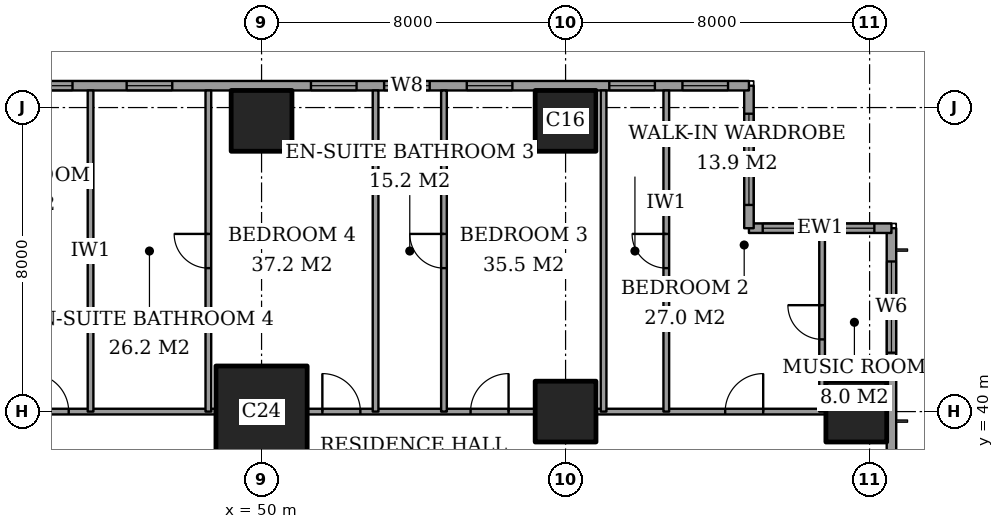
"""IFC4 building model, lengths in metres.
Left out: names, types, materials, properties, quantities, classifications, styles, units other than length and angle.
Written with IfcOpenShell. Run it as: python <this file> out.ifc"""

import sys

from ifc_helpers import new_model, si_unit, direction, frame, frame_2d, origin, origin_2d, place, context, subcontext, project, spatial, rectangle, extrude, element, fill, save


model = new_model("IFC4")
c1 = context("Model", 3, precision=1e-05, world=origin(), true_north=direction((0.0, 1.0)))
c2 = subcontext(c1, "Body", "Model", "MODEL_VIEW")
j1 = project(units=[si_unit("LENGTHUNIT", "METRE"), si_unit("PLANEANGLEUNIT", "RADIAN")], contexts=[c1])
p1 = place(None, origin())
s1 = spatial("IfcSite", under=j1, at=p1, CompositionType="ELEMENT")
p2 = place(p1, origin())
s2 = spatial("IfcBuilding", under=s1, at=p2, CompositionType="ELEMENT")
p3 = place(p2, frame((0.0, 0.0, 237.6)))
s3 = spatial("IfcBuildingStorey", under=s2, at=p3, CompositionType="ELEMENT", Elevation=237.6)
p4 = place(p3, frame((50.0, 40.0, 0.0), z_axis=(0.0, 0.0, 1.0), x_axis=(1.0, 0.0, 0.0)))
e1 = element("IfcColumn", 1, at=p4, inside=s3, PredefinedType="COLUMN", context=c2, shape_type="SweptSolid", body=[
    extrude(rectangle(XDim=2.4, YDim=2.4, at=origin_2d()), origin(), (0.0, 0.0, 1.0), 3.6),
])
for number, where, z_axis, x_axis in (
    (2, (50.0, 47.65, 0.0), (0.0, 0.0, 1.0), (1.0, 0.0, 0.0)),
    (3, (58.0, 40.0, 0.0), (0.0, 0.0, 1.0), (1.0, 0.0, 0.0)),
    (4, (58.0, 47.65, 0.0), (0.0, 0.0, 1.0), (1.0, 0.0, 0.0)),
    (5, (65.65, 40.0, 0.0), (0.0, 0.0, 1.0), (1.0, 0.0, 0.0)),
):
    element("IfcColumn", number, at=place(p3, frame(where, z_axis=z_axis, x_axis=x_axis)), inside=s3, PredefinedType="COLUMN", context=c2, shape_type="SweptSolid", body=[
        extrude(rectangle(XDim=1.6, YDim=1.6, at=origin_2d()), origin(), (0.0, 0.0, 1.0), 3.6),
    ])
p5 = place(p3, frame((66.575, 3.175, 0.0), z_axis=(0.0, 0.0, 1.0), x_axis=(0.0, 1.0, 0.0)))
e6 = element("IfcWall", 6, at=p5, inside=s3, PredefinedType="SOLIDWALL", context=c2, shape_type="SweptSolid", body=[
    extrude(rectangle(XDim=41.65, YDim=0.25, at=frame_2d((20.825, 0.0))), origin(), (0.0, 0.0, 1.0), 3.6),
])
p6 = place(p5, frame((0.875, 0.0, 0.6)))
e7 = element("IfcOpeningElement", 7, at=p6, cuts=e6, PredefinedType="OPENING", context=c2, shape_type="SweptSolid", body=[
    extrude(rectangle(XDim=2.4, YDim=2.0, at=frame_2d((1.2, 1.0))), frame((0.0, 0.135, 0.0), z_axis=(0.0, -1.0, 0.0), x_axis=(1.0, 0.0, 0.0)), (0.0, 0.0, 1.0), 0.27),
])
p7 = place(p5, frame((6.225, 0.0, 0.6)))
e8 = element("IfcOpeningElement", 8, at=p7, cuts=e6, PredefinedType="OPENING", context=c2, shape_type="SweptSolid", body=[
    extrude(rectangle(XDim=1.2, YDim=2.0, at=frame_2d((0.6, 1.0))), frame((0.0, 0.135, 0.0), z_axis=(0.0, -1.0, 0.0), x_axis=(1.0, 0.0, 0.0)), (0.0, 0.0, 1.0), 0.27),
])
p8 = place(p5, frame((8.725, 0.0, 0.6)))
e9 = element("IfcOpeningElement", 9, at=p8, cuts=e6, PredefinedType="OPENING", context=c2, shape_type="SweptSolid", body=[
    extrude(rectangle(XDim=2.4, YDim=2.0, at=frame_2d((1.2, 1.0))), frame((0.0, 0.135, 0.0), z_axis=(0.0, -1.0, 0.0), x_axis=(1.0, 0.0, 0.0)), (0.0, 0.0, 1.0), 0.27),
])
p9 = place(p5, frame((15.725, 0.0, 0.6)))
e10 = element("IfcOpeningElement", 10, at=p9, cuts=e6, PredefinedType="OPENING", context=c2, shape_type="SweptSolid", body=[
    extrude(rectangle(XDim=2.4, YDim=2.0, at=frame_2d((1.2, 1.0))), frame((0.0, 0.135, 0.0), z_axis=(0.0, -1.0, 0.0), x_axis=(1.0, 0.0, 0.0)), (0.0, 0.0, 1.0), 0.27),
])
p10 = place(p5, frame((23.525, 0.0, 0.6)))
e11 = element("IfcOpeningElement", 11, at=p10, cuts=e6, PredefinedType="OPENING", context=c2, shape_type="SweptSolid", body=[
    extrude(rectangle(XDim=2.4, YDim=2.0, at=frame_2d((1.2, 1.0))), frame((0.0, 0.135, 0.0), z_axis=(0.0, -1.0, 0.0), x_axis=(1.0, 0.0, 0.0)), (0.0, 0.0, 1.0), 0.27),
])
p11 = place(p5, frame((30.725, 0.0, 0.6)))
e12 = element("IfcOpeningElement", 12, at=p11, cuts=e6, PredefinedType="OPENING", context=c2, shape_type="SweptSolid", body=[
    extrude(rectangle(XDim=2.4, YDim=2.0, at=frame_2d((1.2, 1.0))), frame((0.0, 0.135, 0.0), z_axis=(0.0, -1.0, 0.0), x_axis=(1.0, 0.0, 0.0)), (0.0, 0.0, 1.0), 0.27),
])
p12 = place(p5, frame((34.525, 0.0, 0.6)))
e13 = element("IfcOpeningElement", 13, at=p12, cuts=e6, PredefinedType="OPENING", context=c2, shape_type="SweptSolid", body=[
    extrude(rectangle(XDim=1.2, YDim=2.0, at=frame_2d((0.6, 1.0))), frame((0.0, 0.135, 0.0), z_axis=(0.0, -1.0, 0.0), x_axis=(1.0, 0.0, 0.0)), (0.0, 0.0, 1.0), 0.27),
])
p13 = place(p5, frame((38.375, 0.0, 0.6)))
e14 = element("IfcOpeningElement", 14, at=p13, cuts=e6, PredefinedType="OPENING", context=c2, shape_type="SweptSolid", body=[
    extrude(rectangle(XDim=2.4, YDim=2.0, at=frame_2d((1.2, 1.0))), frame((0.0, 0.135, 0.0), z_axis=(0.0, -1.0, 0.0), x_axis=(1.0, 0.0, 0.0)), (0.0, 0.0, 1.0), 0.27),
])
p14 = place(p3, frame((66.575, 44.825, 0.0), z_axis=(0.0, 0.0, 1.0), x_axis=(-1.0, 0.0, 0.0)))
e15 = element("IfcWall", 15, at=p14, inside=s3, PredefinedType="SOLIDWALL", context=c2, shape_type="SweptSolid", body=[
    extrude(rectangle(XDim=3.75, YDim=0.25, at=frame_2d((1.875, 0.0))), origin(), (0.0, 0.0, 1.0), 3.6),
])
p15 = place(p14, frame((0.45, 0.0, 0.6)))
e16 = element("IfcOpeningElement", 16, at=p15, cuts=e15, PredefinedType="OPENING", context=c2, shape_type="SweptSolid", body=[
    extrude(rectangle(XDim=1.2, YDim=2.0, at=frame_2d((0.6, 1.0))), frame((0.0, 0.135, 0.0), z_axis=(0.0, -1.0, 0.0), x_axis=(1.0, 0.0, 0.0)), (0.0, 0.0, 1.0), 0.27),
])
p16 = place(p14, frame((2.188, 0.0, 0.6)))
e17 = element("IfcOpeningElement", 17, at=p16, cuts=e15, PredefinedType="OPENING", context=c2, shape_type="SweptSolid", body=[
    extrude(rectangle(XDim=1.2, YDim=2.0, at=frame_2d((0.6, 1.0))), frame((0.0, 0.135, 0.0), z_axis=(0.0, -1.0, 0.0), x_axis=(1.0, 0.0, 0.0)), (0.0, 0.0, 1.0), 0.27),
])
p17 = place(p3, frame((62.825, 44.825, 0.0), z_axis=(0.0, 0.0, 1.0), x_axis=(0.0, 1.0, 0.0)))
e18 = element("IfcWall", 18, at=p17, inside=s3, PredefinedType="SOLIDWALL", context=c2, shape_type="SweptSolid", body=[
    extrude(rectangle(XDim=3.75, YDim=0.25, at=frame_2d((1.875, 0.0))), origin(), (0.0, 0.0, 1.0), 3.6),
])
p18 = place(p17, frame((0.613, 0.0, 0.6)))
e19 = element("IfcOpeningElement", 19, at=p18, cuts=e18, PredefinedType="OPENING", context=c2, shape_type="SweptSolid", body=[
    extrude(rectangle(XDim=2.4, YDim=2.0, at=frame_2d((1.2, 1.0))), frame((0.0, 0.135, 0.0), z_axis=(0.0, -1.0, 0.0), x_axis=(1.0, 0.0, 0.0)), (0.0, 0.0, 1.0), 0.27),
])
p19 = place(p3, frame((62.825, 48.575, 0.0), z_axis=(0.0, 0.0, 1.0), x_axis=(-1.0, 0.0, 0.0)))
e20 = element("IfcWall", 20, at=p19, inside=s3, PredefinedType="SOLIDWALL", context=c2, shape_type="SweptSolid", body=[
    extrude(rectangle(XDim=21.4, YDim=0.25, at=frame_2d((10.7, 0.0))), origin(), (0.0, 0.0, 1.0), 3.6),
])
p20 = place(p19, frame((0.55, 0.0, 0.6)))
e21 = element("IfcOpeningElement", 21, at=p20, cuts=e20, PredefinedType="OPENING", context=c2, shape_type="SweptSolid", body=[
    extrude(rectangle(XDim=1.2, YDim=2.0, at=frame_2d((0.6, 1.0))), frame((0.0, 0.135, 0.0), z_axis=(0.0, -1.0, 0.0), x_axis=(1.0, 0.0, 0.0)), (0.0, 0.0, 1.0), 0.27),
])
p21 = place(p19, frame((2.475, 0.0, 0.6)))
e22 = element("IfcOpeningElement", 22, at=p21, cuts=e20, PredefinedType="OPENING", context=c2, shape_type="SweptSolid", body=[
    extrude(rectangle(XDim=1.2, YDim=2.0, at=frame_2d((0.6, 1.0))), frame((0.0, 0.135, 0.0), z_axis=(0.0, -1.0, 0.0), x_axis=(1.0, 0.0, 0.0)), (0.0, 0.0, 1.0), 0.27),
])
p22 = place(p19, frame((6.225, 0.0, 0.6)))
e23 = element("IfcOpeningElement", 23, at=p22, cuts=e20, PredefinedType="OPENING", context=c2, shape_type="SweptSolid", body=[
    extrude(rectangle(XDim=1.2, YDim=2.0, at=frame_2d((0.6, 1.0))), frame((0.0, 0.135, 0.0), z_axis=(0.0, -1.0, 0.0), x_axis=(1.0, 0.0, 0.0)), (0.0, 0.0, 1.0), 0.27),
])
p23 = place(p19, frame((8.4, 0.0, 0.6)))
e24 = element("IfcOpeningElement", 24, at=p23, cuts=e20, PredefinedType="OPENING", context=c2, shape_type="SweptSolid", body=[
    extrude(rectangle(XDim=1.2, YDim=2.0, at=frame_2d((0.6, 1.0))), frame((0.0, 0.135, 0.0), z_axis=(0.0, -1.0, 0.0), x_axis=(1.0, 0.0, 0.0)), (0.0, 0.0, 1.0), 0.27),
])
p24 = place(p19, frame((10.325, 0.0, 0.6)))
e25 = element("IfcOpeningElement", 25, at=p24, cuts=e20, PredefinedType="OPENING", context=c2, shape_type="SweptSolid", body=[
    extrude(rectangle(XDim=1.2, YDim=2.0, at=frame_2d((0.6, 1.0))), frame((0.0, 0.135, 0.0), z_axis=(0.0, -1.0, 0.0), x_axis=(1.0, 0.0, 0.0)), (0.0, 0.0, 1.0), 0.27),
])
p25 = place(p19, frame((15.175, 0.0, 0.6)))
e26 = element("IfcOpeningElement", 26, at=p25, cuts=e20, PredefinedType="OPENING", context=c2, shape_type="SweptSolid", body=[
    extrude(rectangle(XDim=1.2, YDim=2.0, at=frame_2d((0.6, 1.0))), frame((0.0, 0.135, 0.0), z_axis=(0.0, -1.0, 0.0), x_axis=(1.0, 0.0, 0.0)), (0.0, 0.0, 1.0), 0.27),
])
p26 = place(p19, frame((17.8, 0.0, 0.6)))
e27 = element("IfcOpeningElement", 27, at=p26, cuts=e20, PredefinedType="OPENING", context=c2, shape_type="SweptSolid", body=[
    extrude(rectangle(XDim=1.2, YDim=2.0, at=frame_2d((0.6, 1.0))), frame((0.0, 0.135, 0.0), z_axis=(0.0, -1.0, 0.0), x_axis=(1.0, 0.0, 0.0)), (0.0, 0.0, 1.0), 0.27),
])
p27 = place(p3, frame((43.35, 40.0, 0.0), z_axis=(0.0, 0.0, 1.0), x_axis=(1.0, 0.0, 0.0)))
e28 = element("IfcWall", 28, at=p27, inside=s3, PredefinedType="PARTITIONING", context=c2, shape_type="SweptSolid", body=[
    extrude(rectangle(XDim=5.45, YDim=0.15, at=frame_2d((2.725, 0.0))), origin(), (0.0, 0.0, 1.0), 3.35),
])
p28 = place(p27, frame((0.575, 0.0, 0.0)))
e29 = element("IfcOpeningElement", 29, at=p28, cuts=e28, PredefinedType="OPENING", context=c2, shape_type="SweptSolid", body=[
    extrude(rectangle(XDim=1.0, YDim=2.1, at=frame_2d((0.5, 1.05))), frame((0.0, 0.085, 0.0), z_axis=(0.0, -1.0, 0.0), x_axis=(1.0, 0.0, 0.0)), (0.0, 0.0, 1.0), 0.17),
])
p29 = place(p3, frame((51.2, 40.0, 0.0), z_axis=(0.0, 0.0, 1.0), x_axis=(1.0, 0.0, 0.0)))
e30 = element("IfcWall", 30, at=p29, inside=s3, PredefinedType="PARTITIONING", context=c2, shape_type="SweptSolid", body=[
    extrude(rectangle(XDim=6.0, YDim=0.15, at=frame_2d((3.0, 0.0))), origin(), (0.0, 0.0, 1.0), 3.35),
])
p30 = place(p29, frame((4.3, 0.0, 0.0)))
e31 = element("IfcOpeningElement", 31, at=p30, cuts=e30, PredefinedType="OPENING", context=c2, shape_type="SweptSolid", body=[
    extrude(rectangle(XDim=1.0, YDim=2.1, at=frame_2d((0.5, 1.05))), frame((0.0, 0.085, 0.0), z_axis=(0.0, -1.0, 0.0), x_axis=(1.0, 0.0, 0.0)), (0.0, 0.0, 1.0), 0.17),
])
p31 = place(p29, frame((0.4, 0.0, 0.0)))
e32 = element("IfcOpeningElement", 32, at=p31, cuts=e30, PredefinedType="OPENING", context=c2, shape_type="SweptSolid", body=[
    extrude(rectangle(XDim=1.0, YDim=2.1, at=frame_2d((0.5, 1.05))), frame((0.0, 0.085, 0.0), z_axis=(0.0, -1.0, 0.0), x_axis=(1.0, 0.0, 0.0)), (0.0, 0.0, 1.0), 0.17),
])
p32 = place(p3, frame((58.8, 40.0, 0.0), z_axis=(0.0, 0.0, 1.0), x_axis=(1.0, 0.0, 0.0)))
e33 = element("IfcWall", 33, at=p32, inside=s3, PredefinedType="PARTITIONING", context=c2, shape_type="SweptSolid", body=[
    extrude(rectangle(XDim=6.05, YDim=0.15, at=frame_2d((3.025, 0.0))), origin(), (0.0, 0.0, 1.0), 3.35),
])
p33 = place(p32, frame((3.4, 0.0, 0.0)))
e34 = element("IfcOpeningElement", 34, at=p33, cuts=e33, PredefinedType="OPENING", context=c2, shape_type="SweptSolid", body=[
    extrude(rectangle(XDim=1.0, YDim=2.1, at=frame_2d((0.5, 1.05))), frame((0.0, 0.085, 0.0), z_axis=(0.0, -1.0, 0.0), x_axis=(1.0, 0.0, 0.0)), (0.0, 0.0, 1.0), 0.17),
])
p34 = place(p3, frame((45.5, 40.0, 0.0), z_axis=(0.0, 0.0, 1.0), x_axis=(0.0, 1.0, 0.0)))
e35 = element("IfcWall", 35, at=p34, inside=s3, PredefinedType="PARTITIONING", context=c2, shape_type="SweptSolid", body=[
    extrude(rectangle(XDim=8.45, YDim=0.15, at=frame_2d((4.225, 0.0))), origin(), (0.0, 0.0, 1.0), 3.35),
])
p35 = place(p3, frame((48.6, 40.0, 0.0), z_axis=(0.0, 0.0, 1.0), x_axis=(0.0, 1.0, 0.0)))
e36 = element("IfcWall", 36, at=p35, inside=s3, PredefinedType="PARTITIONING", context=c2, shape_type="SweptSolid", body=[
    extrude(rectangle(XDim=8.45, YDim=0.15, at=frame_2d((4.225, 0.0))), origin(), (0.0, 0.0, 1.0), 3.35),
])
p36 = place(p35, frame((3.775, 0.0, 0.0)))
e37 = element("IfcOpeningElement", 37, at=p36, cuts=e36, PredefinedType="OPENING", context=c2, shape_type="SweptSolid", body=[
    extrude(rectangle(XDim=0.9, YDim=2.1, at=frame_2d((0.45, 1.05))), frame((0.0, 0.085, 0.0), z_axis=(0.0, -1.0, 0.0), x_axis=(1.0, 0.0, 0.0)), (0.0, 0.0, 1.0), 0.17),
])
p37 = place(p3, frame((53.0, 40.0, 0.0), z_axis=(0.0, 0.0, 1.0), x_axis=(0.0, 1.0, 0.0)))
e38 = element("IfcWall", 38, at=p37, inside=s3, PredefinedType="PARTITIONING", context=c2, shape_type="SweptSolid", body=[
    extrude(rectangle(XDim=8.45, YDim=0.15, at=frame_2d((4.225, 0.0))), origin(), (0.0, 0.0, 1.0), 3.35),
])
p38 = place(p3, frame((54.8, 40.0, 0.0), z_axis=(0.0, 0.0, 1.0), x_axis=(0.0, 1.0, 0.0)))
e39 = element("IfcWall", 39, at=p38, inside=s3, PredefinedType="PARTITIONING", context=c2, shape_type="SweptSolid", body=[
    extrude(rectangle(XDim=8.45, YDim=0.15, at=frame_2d((4.225, 0.0))), origin(), (0.0, 0.0, 1.0), 3.35),
])
p39 = place(p38, frame((3.775, 0.0, 0.0)))
e40 = element("IfcOpeningElement", 40, at=p39, cuts=e39, PredefinedType="OPENING", context=c2, shape_type="SweptSolid", body=[
    extrude(rectangle(XDim=0.9, YDim=2.1, at=frame_2d((0.45, 1.05))), frame((0.0, 0.085, 0.0), z_axis=(0.0, -1.0, 0.0), x_axis=(1.0, 0.0, 0.0)), (0.0, 0.0, 1.0), 0.17),
])
p40 = place(p3, frame((59.0, 40.0, 0.0), z_axis=(0.0, 0.0, 1.0), x_axis=(0.0, 1.0, 0.0)))
e41 = element("IfcWall", 41, at=p40, inside=s3, PredefinedType="PARTITIONING", context=c2, shape_type="SweptSolid", body=[
    extrude(rectangle(XDim=8.45, YDim=0.15, at=frame_2d((4.225, 0.0))), origin(), (0.0, 0.0, 1.0), 3.35),
])
p41 = place(p3, frame((60.65, 40.0, 0.0), z_axis=(0.0, 0.0, 1.0), x_axis=(0.0, 1.0, 0.0)))
e42 = element("IfcWall", 42, at=p41, inside=s3, PredefinedType="PARTITIONING", context=c2, shape_type="SweptSolid", body=[
    extrude(rectangle(XDim=8.45, YDim=0.15, at=frame_2d((4.225, 0.0))), origin(), (0.0, 0.0, 1.0), 3.35),
])
p42 = place(p41, frame((3.775, 0.0, 0.0)))
e43 = element("IfcOpeningElement", 43, at=p42, cuts=e42, PredefinedType="OPENING", context=c2, shape_type="SweptSolid", body=[
    extrude(rectangle(XDim=0.9, YDim=2.1, at=frame_2d((0.45, 1.05))), frame((0.0, 0.085, 0.0), z_axis=(0.0, -1.0, 0.0), x_axis=(1.0, 0.0, 0.0)), (0.0, 0.0, 1.0), 0.17),
])
p43 = place(p3, frame((64.75, 40.0, 0.0), z_axis=(0.0, 0.0, 1.0), x_axis=(0.0, 1.0, 0.0)))
e44 = element("IfcWall", 44, at=p43, inside=s3, PredefinedType="PARTITIONING", context=c2, shape_type="SweptSolid", body=[
    extrude(rectangle(XDim=4.7, YDim=0.15, at=frame_2d((2.35, 0.0))), origin(), (0.0, 0.0, 1.0), 3.35),
])
p44 = place(p43, frame((1.9, 0.0, 0.0)))
e45 = element("IfcOpeningElement", 45, at=p44, cuts=e44, PredefinedType="OPENING", context=c2, shape_type="SweptSolid", body=[
    extrude(rectangle(XDim=0.9, YDim=2.1, at=frame_2d((0.45, 1.05))), frame((0.0, 0.085, 0.0), z_axis=(0.0, -1.0, 0.0), x_axis=(1.0, 0.0, 0.0)), (0.0, 0.0, 1.0), 0.17),
])
p45 = place(p13, origin())
e46 = element("IfcWindow", 46, at=p45, inside=s3, PartitioningType="SINGLE_PANEL", PredefinedType="WINDOW", context=c2, shape_type="SweptSolid", body=[
    extrude(rectangle(XDim=2.4, YDim=2.0, at=frame_2d((1.2, 1.0))), frame((0.0, 0.03, 0.0), z_axis=(0.0, -1.0, 0.0), x_axis=(1.0, 0.0, 0.0)), (0.0, 0.0, 1.0), 0.06),
])
fill(e14, e46)
p46 = place(p15, origin())
e47 = element("IfcWindow", 47, at=p46, inside=s3, PartitioningType="SINGLE_PANEL", PredefinedType="WINDOW", context=c2, shape_type="SweptSolid", body=[
    extrude(rectangle(XDim=1.2, YDim=2.0, at=frame_2d((0.6, 1.0))), frame((0.0, 0.03, 0.0), z_axis=(0.0, -1.0, 0.0), x_axis=(1.0, 0.0, 0.0)), (0.0, 0.0, 1.0), 0.06),
])
fill(e16, e47)
p47 = place(p16, origin())
e48 = element("IfcWindow", 48, at=p47, inside=s3, PartitioningType="SINGLE_PANEL", PredefinedType="WINDOW", context=c2, shape_type="SweptSolid", body=[
    extrude(rectangle(XDim=1.2, YDim=2.0, at=frame_2d((0.6, 1.0))), frame((0.0, 0.03, 0.0), z_axis=(0.0, -1.0, 0.0), x_axis=(1.0, 0.0, 0.0)), (0.0, 0.0, 1.0), 0.06),
])
fill(e17, e48)
p48 = place(p18, origin())
e49 = element("IfcWindow", 49, at=p48, inside=s3, PartitioningType="SINGLE_PANEL", PredefinedType="WINDOW", context=c2, shape_type="SweptSolid", body=[
    extrude(rectangle(XDim=2.4, YDim=2.0, at=frame_2d((1.2, 1.0))), frame((0.0, 0.03, 0.0), z_axis=(0.0, -1.0, 0.0), x_axis=(1.0, 0.0, 0.0)), (0.0, 0.0, 1.0), 0.06),
])
fill(e19, e49)
p49 = place(p20, origin())
e50 = element("IfcWindow", 50, at=p49, inside=s3, PartitioningType="SINGLE_PANEL", PredefinedType="WINDOW", context=c2, shape_type="SweptSolid", body=[
    extrude(rectangle(XDim=1.2, YDim=2.0, at=frame_2d((0.6, 1.0))), frame((0.0, 0.03, 0.0), z_axis=(0.0, -1.0, 0.0), x_axis=(1.0, 0.0, 0.0)), (0.0, 0.0, 1.0), 0.06),
])
fill(e21, e50)
p50 = place(p21, origin())
e51 = element("IfcWindow", 51, at=p50, inside=s3, PartitioningType="SINGLE_PANEL", PredefinedType="WINDOW", context=c2, shape_type="SweptSolid", body=[
    extrude(rectangle(XDim=1.2, YDim=2.0, at=frame_2d((0.6, 1.0))), frame((0.0, 0.03, 0.0), z_axis=(0.0, -1.0, 0.0), x_axis=(1.0, 0.0, 0.0)), (0.0, 0.0, 1.0), 0.06),
])
fill(e22, e51)
p51 = place(p22, origin())
e52 = element("IfcWindow", 52, at=p51, inside=s3, PartitioningType="SINGLE_PANEL", PredefinedType="WINDOW", context=c2, shape_type="SweptSolid", body=[
    extrude(rectangle(XDim=1.2, YDim=2.0, at=frame_2d((0.6, 1.0))), frame((0.0, 0.03, 0.0), z_axis=(0.0, -1.0, 0.0), x_axis=(1.0, 0.0, 0.0)), (0.0, 0.0, 1.0), 0.06),
])
fill(e23, e52)
p52 = place(p23, origin())
e53 = element("IfcWindow", 53, at=p52, inside=s3, PartitioningType="SINGLE_PANEL", PredefinedType="WINDOW", context=c2, shape_type="SweptSolid", body=[
    extrude(rectangle(XDim=1.2, YDim=2.0, at=frame_2d((0.6, 1.0))), frame((0.0, 0.03, 0.0), z_axis=(0.0, -1.0, 0.0), x_axis=(1.0, 0.0, 0.0)), (0.0, 0.0, 1.0), 0.06),
])
fill(e24, e53)
p53 = place(p24, origin())
e54 = element("IfcWindow", 54, at=p53, inside=s3, PartitioningType="SINGLE_PANEL", PredefinedType="WINDOW", context=c2, shape_type="SweptSolid", body=[
    extrude(rectangle(XDim=1.2, YDim=2.0, at=frame_2d((0.6, 1.0))), frame((0.0, 0.03, 0.0), z_axis=(0.0, -1.0, 0.0), x_axis=(1.0, 0.0, 0.0)), (0.0, 0.0, 1.0), 0.06),
])
fill(e25, e54)
p54 = place(p25, origin())
e55 = element("IfcWindow", 55, at=p54, inside=s3, PartitioningType="SINGLE_PANEL", PredefinedType="WINDOW", context=c2, shape_type="SweptSolid", body=[
    extrude(rectangle(XDim=1.2, YDim=2.0, at=frame_2d((0.6, 1.0))), frame((0.0, 0.03, 0.0), z_axis=(0.0, -1.0, 0.0), x_axis=(1.0, 0.0, 0.0)), (0.0, 0.0, 1.0), 0.06),
])
fill(e26, e55)
p55 = place(p26, origin())
e56 = element("IfcWindow", 56, at=p55, inside=s3, PartitioningType="SINGLE_PANEL", PredefinedType="WINDOW", context=c2, shape_type="SweptSolid", body=[
    extrude(rectangle(XDim=1.2, YDim=2.0, at=frame_2d((0.6, 1.0))), frame((0.0, 0.03, 0.0), z_axis=(0.0, -1.0, 0.0), x_axis=(1.0, 0.0, 0.0)), (0.0, 0.0, 1.0), 0.06),
])
fill(e27, e56)
p56 = place(p44, origin())
e57 = element("IfcDoor", 57, at=p56, inside=s3, OperationType="SINGLE_SWING_LEFT", PredefinedType="DOOR", context=c2, shape_type="SweptSolid", body=[
    extrude(rectangle(XDim=0.9, YDim=2.1, at=frame_2d((0.45, 1.05))), frame((0.0, 0.025, 0.0), z_axis=(0.0, -1.0, 0.0), x_axis=(1.0, 0.0, 0.0)), (0.0, 0.0, 1.0), 0.05),
])
fill(e45, e57)
p57 = place(p33, origin())
e58 = element("IfcDoor", 58, at=p57, inside=s3, OperationType="SINGLE_SWING_LEFT", PredefinedType="DOOR", context=c2, shape_type="SweptSolid", body=[
    extrude(rectangle(XDim=1.0, YDim=2.1, at=frame_2d((0.5, 1.05))), frame((0.0, 0.025, 0.0), z_axis=(0.0, -1.0, 0.0), x_axis=(1.0, 0.0, 0.0)), (0.0, 0.0, 1.0), 0.05),
])
fill(e34, e58)
p58 = place(p42, origin())
e59 = element("IfcDoor", 59, at=p58, inside=s3, OperationType="SINGLE_SWING_LEFT", PredefinedType="DOOR", context=c2, shape_type="SweptSolid", body=[
    extrude(rectangle(XDim=0.9, YDim=2.1, at=frame_2d((0.45, 1.05))), frame((0.0, 0.025, 0.0), z_axis=(0.0, -1.0, 0.0), x_axis=(1.0, 0.0, 0.0)), (0.0, 0.0, 1.0), 0.05),
])
fill(e43, e59)
p59 = place(p30, origin())
e60 = element("IfcDoor", 60, at=p59, inside=s3, OperationType="SINGLE_SWING_LEFT", PredefinedType="DOOR", context=c2, shape_type="SweptSolid", body=[
    extrude(rectangle(XDim=1.0, YDim=2.1, at=frame_2d((0.5, 1.05))), frame((0.0, 0.025, 0.0), z_axis=(0.0, -1.0, 0.0), x_axis=(1.0, 0.0, 0.0)), (0.0, 0.0, 1.0), 0.05),
])
fill(e31, e60)
p60 = place(p39, origin())
e61 = element("IfcDoor", 61, at=p60, inside=s3, OperationType="SINGLE_SWING_LEFT", PredefinedType="DOOR", context=c2, shape_type="SweptSolid", body=[
    extrude(rectangle(XDim=0.9, YDim=2.1, at=frame_2d((0.45, 1.05))), frame((0.0, 0.025, 0.0), z_axis=(0.0, -1.0, 0.0), x_axis=(1.0, 0.0, 0.0)), (0.0, 0.0, 1.0), 0.05),
])
fill(e40, e61)
p61 = place(p31, origin())
e62 = element("IfcDoor", 62, at=p61, inside=s3, OperationType="SINGLE_SWING_RIGHT", PredefinedType="DOOR", context=c2, shape_type="SweptSolid", body=[
    extrude(rectangle(XDim=1.0, YDim=2.1, at=frame_2d((0.5, 1.05))), frame((0.0, 0.025, 0.0), z_axis=(0.0, -1.0, 0.0), x_axis=(1.0, 0.0, 0.0)), (0.0, 0.0, 1.0), 0.05),
])
fill(e32, e62)
p62 = place(p36, origin())
e63 = element("IfcDoor", 63, at=p62, inside=s3, OperationType="SINGLE_SWING_LEFT", PredefinedType="DOOR", context=c2, shape_type="SweptSolid", body=[
    extrude(rectangle(XDim=0.9, YDim=2.1, at=frame_2d((0.45, 1.05))), frame((0.0, 0.025, 0.0), z_axis=(0.0, -1.0, 0.0), x_axis=(1.0, 0.0, 0.0)), (0.0, 0.0, 1.0), 0.05),
])
fill(e37, e63)
p63 = place(p28, origin())
e64 = element("IfcDoor", 64, at=p63, inside=s3, OperationType="SINGLE_SWING_RIGHT", PredefinedType="DOOR", context=c2, shape_type="SweptSolid", body=[
    extrude(rectangle(XDim=1.0, YDim=2.1, at=frame_2d((0.5, 1.05))), frame((0.0, 0.025, 0.0), z_axis=(0.0, -1.0, 0.0), x_axis=(1.0, 0.0, 0.0)), (0.0, 0.0, 1.0), 0.05),
])
fill(e29, e64)
save(model, sys.argv[1])
